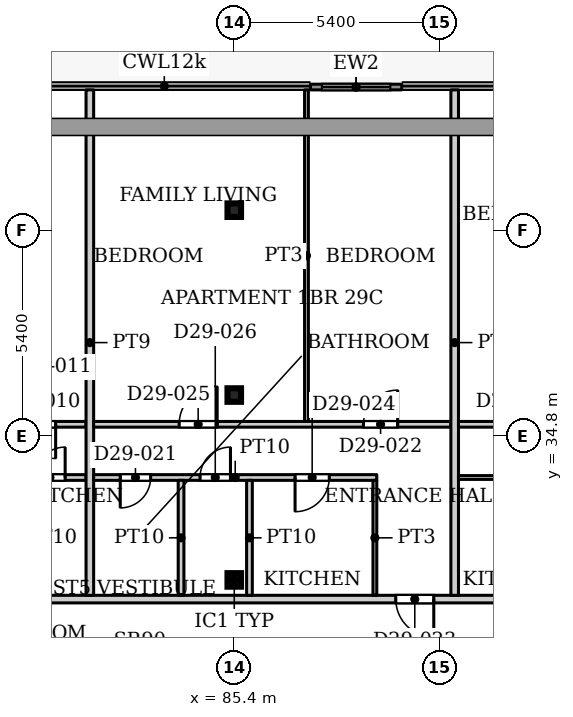
"""IFC4 building model, lengths in metres.
Left out: names, types, materials, properties, quantities, classifications, styles, units other than length and angle.
Written with IfcOpenShell. Run it as: python <this file> out.ifc"""

import sys

from ifc_helpers import new_model, si_unit, direction, frame, frame_2d, origin, origin_2d, place, context, subcontext, project, spatial, rectangle, hollow_rectangle, extrude, source, transform, mapped, element, fill, save


model = new_model("IFC4")
c1 = context("Model", 3, precision=1e-05, world=origin(), true_north=direction((0.0, 1.0)))
c2 = subcontext(c1, "Body", "Model", "MODEL_VIEW")
j1 = project(units=[si_unit("LENGTHUNIT", "METRE"), si_unit("PLANEANGLEUNIT", "RADIAN")], contexts=[c1])
p1 = place(None, origin())
s1 = spatial("IfcSite", under=j1, at=p1, CompositionType="ELEMENT")
p2 = place(p1, origin())
s2 = spatial("IfcBuilding", under=s1, at=p2, CompositionType="ELEMENT")
p3 = place(p2, frame((0.0, 0.0, 125.3)))
s3 = spatial("IfcBuildingStorey", under=s2, at=p3, CompositionType="ELEMENT", Elevation=125.3)
for number, where, z_axis, x_axis in (
    (1, (85.4, 31.005, 0.0), (0.0, 0.0, 1.0), (1.0, 0.0, 0.0)),
    (2, (85.4, 35.87, 0.0), (0.0, 0.0, 1.0), (1.0, 0.0, 0.0)),
    (3, (85.4, 40.735, 0.0), (0.0, 0.0, 1.0), (1.0, 0.0, 0.0)),
):
    element("IfcColumn", number, at=place(p3, frame(where, z_axis=z_axis, x_axis=x_axis)), inside=s3, PredefinedType="COLUMN", context=c2, shape_type="SweptSolid", body=[
        extrude(hollow_rectangle(XDim=0.356, YDim=0.356, WallThickness=0.016, InnerFilletRadius=0.016, OuterFilletRadius=0.032, at=origin_2d()), origin(), (0.0, 0.0, 1.0), 3.9),
    ])
p4 = place(p3, frame((87.406, 43.975, 0.0), z_axis=(0.0, 0.0, 1.0), x_axis=(1.0, 0.0, 0.0)))
e4 = element("IfcWall", 4, at=p4, inside=s3, PredefinedType="SOLIDWALL", context=c2, shape_type="SweptSolid", body=[
    extrude(rectangle(XDim=2.4, YDim=0.15, at=frame_2d((1.2, 0.0))), origin(), (0.0, 0.0, 1.0), 3.75),
])
p5 = place(p4, frame((0.3, 0.0, 0.0)))
e5 = element("IfcOpeningElement", 5, at=p5, cuts=e4, PredefinedType="OPENING", context=c2, shape_type="SweptSolid", body=[
    extrude(rectangle(XDim=1.8, YDim=2.4, at=frame_2d((0.9, 1.2))), frame((0.0, 0.085, 0.0), z_axis=(0.0, -1.0, 0.0), x_axis=(1.0, 0.0, 0.0)), (0.0, 0.0, 1.0), 0.17),
])
p6 = place(p3, frame((55.9, 30.5, 0.0), z_axis=(0.0, 0.0, 1.0), x_axis=(1.0, 0.0, 0.0)))
e6 = element("IfcWall", 6, at=p6, inside=s3, PredefinedType="PARTITIONING", context=c2, shape_type="SweptSolid", body=[
    extrude(rectangle(XDim=42.2, YDim=0.2, at=frame_2d((21.1, 0.0))), origin(), (0.0, 0.0, 1.0), 3.6),
])
p7 = place(p6, frame((0.45, 0.0, 0.0)))
e7 = element("IfcOpeningElement", 7, at=p7, cuts=e6, PredefinedType="OPENING", context=c2, shape_type="SweptSolid", body=[
    extrude(rectangle(XDim=1.0, YDim=2.1, at=frame_2d((0.5, 1.05))), frame((0.0, 0.11, 0.0), z_axis=(0.0, -1.0, 0.0), x_axis=(1.0, 0.0, 0.0)), (0.0, 0.0, 1.0), 0.22),
])
p8 = place(p6, frame((20.1, 0.0, 0.0)))
e8 = element("IfcOpeningElement", 8, at=p8, cuts=e6, PredefinedType="OPENING", context=c2, shape_type="SweptSolid", body=[
    extrude(rectangle(XDim=1.0, YDim=2.1, at=frame_2d((0.5, 1.05))), frame((0.0, 0.11, 0.0), z_axis=(0.0, -1.0, 0.0), x_axis=(1.0, 0.0, 0.0)), (0.0, 0.0, 1.0), 0.22),
])
p9 = place(p6, frame((33.75, 0.0, 0.0)))
e9 = element("IfcOpeningElement", 9, at=p9, cuts=e6, PredefinedType="OPENING", context=c2, shape_type="SweptSolid", body=[
    extrude(rectangle(XDim=1.0, YDim=2.1, at=frame_2d((0.5, 1.05))), frame((0.0, 0.11, 0.0), z_axis=(0.0, -1.0, 0.0), x_axis=(1.0, 0.0, 0.0)), (0.0, 0.0, 1.0), 0.22),
])
p10 = place(p6, frame((38.7, 0.0, 0.0)))
e10 = element("IfcOpeningElement", 10, at=p10, cuts=e6, PredefinedType="OPENING", context=c2, shape_type="SweptSolid", body=[
    extrude(rectangle(XDim=1.0, YDim=2.1, at=frame_2d((0.5, 1.05))), frame((0.0, 0.11, 0.0), z_axis=(0.0, -1.0, 0.0), x_axis=(1.0, 0.0, 0.0)), (0.0, 0.0, 1.0), 0.22),
])
p11 = place(p3, frame((65.8, 35.1, 0.0), z_axis=(0.0, 0.0, 1.0), x_axis=(1.0, 0.0, 0.0)))
e11 = element("IfcWall", 11, at=p11, inside=s3, PredefinedType="PARTITIONING", context=c2, shape_type="SweptSolid", body=[
    extrude(rectangle(XDim=15.7, YDim=0.15, at=frame_2d((7.85, 0.0))), origin(), (0.0, 0.0, 1.0), 3.6),
])
p12 = place(p11, frame((3.95, 0.0, 0.0)))
e12 = element("IfcOpeningElement", 12, at=p12, cuts=e11, PredefinedType="OPENING", context=c2, shape_type="SweptSolid", body=[
    extrude(rectangle(XDim=0.9, YDim=2.1, at=frame_2d((0.45, 1.05))), frame((0.0, 0.085, 0.0), z_axis=(0.0, -1.0, 0.0), x_axis=(1.0, 0.0, 0.0)), (0.0, 0.0, 1.0), 0.17),
])
p13 = place(p11, frame((14.0, 0.0, 0.0)))
e13 = element("IfcOpeningElement", 13, at=p13, cuts=e11, PredefinedType="OPENING", context=c2, shape_type="SweptSolid", body=[
    extrude(rectangle(XDim=0.9, YDim=2.1, at=frame_2d((0.45, 1.05))), frame((0.0, 0.085, 0.0), z_axis=(0.0, -1.0, 0.0), x_axis=(1.0, 0.0, 0.0)), (0.0, 0.0, 1.0), 0.17),
])
p14 = place(p11, frame((1.05, 0.0, 0.0)))
e14 = element("IfcOpeningElement", 14, at=p14, cuts=e11, PredefinedType="OPENING", context=c2, shape_type="SweptSolid", body=[
    extrude(rectangle(XDim=1.0, YDim=2.1, at=frame_2d((0.5, 1.05))), frame((0.0, 0.085, 0.0), z_axis=(0.0, -1.0, 0.0), x_axis=(1.0, 0.0, 0.0)), (0.0, 0.0, 1.0), 0.17),
])
p15 = place(p11, frame((10.5, 0.0, 0.0)))
e15 = element("IfcOpeningElement", 15, at=p15, cuts=e11, PredefinedType="OPENING", context=c2, shape_type="SweptSolid", body=[
    extrude(rectangle(XDim=1.6, YDim=2.1, at=frame_2d((0.8, 1.05))), frame((0.0, 0.085, 0.0), z_axis=(0.0, -1.0, 0.0), x_axis=(1.0, 0.0, 0.0)), (0.0, 0.0, 1.0), 0.17),
])
p16 = place(p11, frame((6.05, 0.0, 0.0)))
e16 = element("IfcOpeningElement", 16, at=p16, cuts=e11, PredefinedType="OPENING", context=c2, shape_type="SweptSolid", body=[
    extrude(rectangle(XDim=0.9, YDim=2.1, at=frame_2d((0.45, 1.05))), frame((0.0, 0.085, 0.0), z_axis=(0.0, -1.0, 0.0), x_axis=(1.0, 0.0, 0.0)), (0.0, 0.0, 1.0), 0.17),
])
p17 = place(p3, frame((77.325, 33.7, 0.0), z_axis=(0.0, 0.0, 1.0), x_axis=(1.0, 0.0, 0.0)))
e17 = element("IfcWall", 17, at=p17, inside=s3, PredefinedType="PARTITIONING", context=c2, shape_type="SweptSolid", body=[
    extrude(rectangle(XDim=4.175, YDim=0.15, at=frame_2d((2.087, 0.0))), origin(), (0.0, 0.0, 1.0), 3.6),
])
p18 = place(p17, frame((0.725, 0.0, 0.0)))
e18 = element("IfcOpeningElement", 18, at=p18, cuts=e17, PredefinedType="OPENING", context=c2, shape_type="SweptSolid", body=[
    extrude(rectangle(XDim=0.8, YDim=2.1, at=frame_2d((0.4, 1.05))), frame((0.0, 0.085, 0.0), z_axis=(0.0, -1.0, 0.0), x_axis=(1.0, 0.0, 0.0)), (0.0, 0.0, 1.0), 0.17),
])
p19 = place(p17, frame((2.825, 0.0, 0.0)))
e19 = element("IfcOpeningElement", 19, at=p19, cuts=e17, PredefinedType="OPENING", context=c2, shape_type="SweptSolid", body=[
    extrude(rectangle(XDim=0.8, YDim=2.1, at=frame_2d((0.4, 1.05))), frame((0.0, 0.085, 0.0), z_axis=(0.0, -1.0, 0.0), x_axis=(1.0, 0.0, 0.0)), (0.0, 0.0, 1.0), 0.17),
])
p20 = place(p3, frame((81.6, 30.6, 0.0), z_axis=(0.0, 0.0, 1.0), x_axis=(0.0, 1.0, 0.0)))
e20 = element("IfcWall", 20, at=p20, inside=s3, PredefinedType="PARTITIONING", context=c2, shape_type="SweptSolid", body=[
    extrude(rectangle(XDim=13.3, YDim=0.2, at=frame_2d((6.65, 0.0))), origin(), (0.0, 0.0, 1.0), 3.6),
])
p21 = place(p3, frame((81.7, 33.7, 0.0), z_axis=(0.0, 0.0, 1.0), x_axis=(1.0, 0.0, 0.0)))
e21 = element("IfcWall", 21, at=p21, inside=s3, PredefinedType="PARTITIONING", context=c2, shape_type="SweptSolid", body=[
    extrude(rectangle(XDim=7.45, YDim=0.15, at=frame_2d((3.725, 0.0))), origin(), (0.0, 0.0, 1.0), 3.6),
])
p22 = place(p21, frame((0.7, 0.0, 0.0)))
e22 = element("IfcOpeningElement", 22, at=p22, cuts=e21, PredefinedType="OPENING", context=c2, shape_type="SweptSolid", body=[
    extrude(rectangle(XDim=0.8, YDim=2.1, at=frame_2d((0.4, 1.05))), frame((0.0, 0.085, 0.0), z_axis=(0.0, -1.0, 0.0), x_axis=(1.0, 0.0, 0.0)), (0.0, 0.0, 1.0), 0.17),
])
p23 = place(p21, frame((5.3, 0.0, 0.0)))
e23 = element("IfcOpeningElement", 23, at=p23, cuts=e21, PredefinedType="OPENING", context=c2, shape_type="SweptSolid", body=[
    extrude(rectangle(XDim=0.9, YDim=2.1, at=frame_2d((0.45, 1.05))), frame((0.0, 0.085, 0.0), z_axis=(0.0, -1.0, 0.0), x_axis=(1.0, 0.0, 0.0)), (0.0, 0.0, 1.0), 0.17),
])
p24 = place(p21, frame((2.8, 0.0, 0.0)))
e24 = element("IfcOpeningElement", 24, at=p24, cuts=e21, PredefinedType="OPENING", context=c2, shape_type="SweptSolid", body=[
    extrude(rectangle(XDim=0.8, YDim=2.1, at=frame_2d((0.4, 1.05))), frame((0.0, 0.085, 0.0), z_axis=(0.0, -1.0, 0.0), x_axis=(1.0, 0.0, 0.0)), (0.0, 0.0, 1.0), 0.17),
])
p25 = place(p3, frame((81.7, 35.1, 0.0), z_axis=(0.0, 0.0, 1.0), x_axis=(1.0, 0.0, 0.0)))
e25 = element("IfcWall", 25, at=p25, inside=s3, PredefinedType="PARTITIONING", context=c2, shape_type="SweptSolid", body=[
    extrude(rectangle(XDim=9.4, YDim=0.15, at=frame_2d((4.7, 0.0))), origin(), (0.0, 0.0, 1.0), 3.6),
])
p26 = place(p25, frame((7.1, 0.0, 0.0)))
e26 = element("IfcOpeningElement", 26, at=p26, cuts=e25, PredefinedType="OPENING", context=c2, shape_type="SweptSolid", body=[
    extrude(rectangle(XDim=0.9, YDim=2.1, at=frame_2d((0.45, 1.05))), frame((0.0, 0.085, 0.0), z_axis=(0.0, -1.0, 0.0), x_axis=(1.0, 0.0, 0.0)), (0.0, 0.0, 1.0), 0.17),
])
p27 = place(p25, frame((2.25, 0.0, 0.0)))
e27 = element("IfcOpeningElement", 27, at=p27, cuts=e25, PredefinedType="OPENING", context=c2, shape_type="SweptSolid", body=[
    extrude(rectangle(XDim=1.0, YDim=2.1, at=frame_2d((0.5, 1.05))), frame((0.0, 0.085, 0.0), z_axis=(0.0, -1.0, 0.0), x_axis=(1.0, 0.0, 0.0)), (0.0, 0.0, 1.0), 0.17),
])
for number, where, z_axis, x_axis in (
    (28, (84.0, 30.6, 0.0), (0.0, 0.0, 1.0), (0.0, 1.0, 0.0)),
    (29, (85.8, 30.6, 0.0), (0.0, 0.0, 1.0), (0.0, 1.0, 0.0)),
):
    element("IfcWall", number, at=place(p3, frame(where, z_axis=z_axis, x_axis=x_axis)), inside=s3, PredefinedType="PARTITIONING", context=c2, shape_type="SweptSolid", body=[
        extrude(rectangle(XDim=3.025, YDim=0.15, at=frame_2d((1.512, 0.0))), origin(), (0.0, 0.0, 1.0), 3.6),
    ])
p28 = place(p3, frame((87.3, 35.175, 0.0), z_axis=(0.0, 0.0, 1.0), x_axis=(0.0, 1.0, 0.0)))
e30 = element("IfcWall", 30, at=p28, inside=s3, PredefinedType="PARTITIONING", context=c2, shape_type="SweptSolid", body=[
    extrude(rectangle(XDim=8.725, YDim=0.1, at=frame_2d((4.362, 0.0))), origin(), (0.0, 0.0, 1.0), 3.6),
])
p29 = place(p3, frame((89.1, 30.6, 0.0), z_axis=(0.0, 0.0, 1.0), x_axis=(0.0, 1.0, 0.0)))
e31 = element("IfcWall", 31, at=p29, inside=s3, PredefinedType="PARTITIONING", context=c2, shape_type="SweptSolid", body=[
    extrude(rectangle(XDim=3.025, YDim=0.1, at=frame_2d((1.512, 0.0))), origin(), (0.0, 0.0, 1.0), 3.6),
])
p30 = place(p3, frame((91.2, 30.6, 0.0), z_axis=(0.0, 0.0, 1.0), x_axis=(0.0, 1.0, 0.0)))
e32 = element("IfcWall", 32, at=p30, inside=s3, PredefinedType="PARTITIONING", context=c2, shape_type="SweptSolid", body=[
    extrude(rectangle(XDim=13.3, YDim=0.2, at=frame_2d((6.65, 0.0))), origin(), (0.0, 0.0, 1.0), 3.6),
])
p31 = place(p3, frame((91.3, 33.7, 0.0), z_axis=(0.0, 0.0, 1.0), x_axis=(1.0, 0.0, 0.0)))
e33 = element("IfcWall", 33, at=p31, inside=s3, PredefinedType="PARTITIONING", context=c2, shape_type="SweptSolid", body=[
    extrude(rectangle(XDim=2.85, YDim=0.1, at=frame_2d((1.425, 0.0))), origin(), (0.0, 0.0, 1.0), 3.6),
])
p32 = place(p31, frame((0.95, 0.0, 0.0)))
e34 = element("IfcOpeningElement", 34, at=p32, cuts=e33, PredefinedType="OPENING", context=c2, shape_type="SweptSolid", body=[
    extrude(rectangle(XDim=0.9, YDim=2.1, at=frame_2d((0.45, 1.05))), frame((0.0, 0.06, 0.0), z_axis=(0.0, -1.0, 0.0), x_axis=(1.0, 0.0, 0.0)), (0.0, 0.0, 1.0), 0.12),
])
p33 = place(p3, frame((91.3, 35.1, 0.0), z_axis=(0.0, 0.0, 1.0), x_axis=(1.0, 0.0, 0.0)))
e35 = element("IfcWall", 35, at=p33, inside=s3, PredefinedType="PARTITIONING", context=c2, shape_type="SweptSolid", body=[
    extrude(rectangle(XDim=8.6, YDim=0.15, at=frame_2d((4.3, 0.0))), origin(), (0.0, 0.0, 1.0), 3.6),
])
p34 = place(p33, frame((1.1, 0.0, 0.0)))
e36 = element("IfcOpeningElement", 36, at=p34, cuts=e35, PredefinedType="OPENING", context=c2, shape_type="SweptSolid", body=[
    extrude(rectangle(XDim=0.9, YDim=2.1, at=frame_2d((0.45, 1.05))), frame((0.0, 0.085, 0.0), z_axis=(0.0, -1.0, 0.0), x_axis=(1.0, 0.0, 0.0)), (0.0, 0.0, 1.0), 0.17),
])
p35 = place(p33, frame((5.4, 0.0, 0.0)))
e37 = element("IfcOpeningElement", 37, at=p35, cuts=e35, PredefinedType="OPENING", context=c2, shape_type="SweptSolid", body=[
    extrude(rectangle(XDim=1.0, YDim=2.1, at=frame_2d((0.5, 1.05))), frame((0.0, 0.085, 0.0), z_axis=(0.0, -1.0, 0.0), x_axis=(1.0, 0.0, 0.0)), (0.0, 0.0, 1.0), 0.17),
])
m1 = source(origin(), c2, "Body", "SweptSolid", [
    extrude(rectangle(XDim=1.8, YDim=2.4, at=frame_2d((0.9, 1.2))), frame((0.0, 0.025, 0.0), z_axis=(0.0, -1.0, 0.0), x_axis=(1.0, 0.0, 0.0)), (0.0, 0.0, 1.0), 0.05),
])
p36 = place(p5, origin())
e38 = element("IfcDoor", 38, at=p36, inside=s3, OperationType="SLIDING_TO_LEFT", PredefinedType="DOOR", context=c2, shape_type="MappedRepresentation", body=[
    mapped(m1, transform((0.0, 0.0, 0.0), x_axis=(1.0, 0.0, 0.0), y_axis=(0.0, 1.0, 0.0), z_axis=(0.0, 0.0, 1.0), scale=1.0)),
])
fill(e5, e38)
m2 = source(origin(), c2, "Body", "SweptSolid", [
    extrude(rectangle(XDim=0.9, YDim=2.1, at=frame_2d((0.45, 1.05))), frame((0.0, 0.025, 0.0), z_axis=(0.0, -1.0, 0.0), x_axis=(1.0, 0.0, 0.0)), (0.0, 0.0, 1.0), 0.05),
])
p37 = place(p13, origin())
e39 = element("IfcDoor", 39, at=p37, inside=s3, OperationType="SINGLE_SWING_RIGHT", PredefinedType="DOOR", context=c2, shape_type="MappedRepresentation", body=[
    mapped(m2, transform((0.0, 0.0, 0.0), x_axis=(1.0, 0.0, 0.0), y_axis=(0.0, 1.0, 0.0), z_axis=(0.0, 0.0, 1.0), scale=1.0)),
])
fill(e13, e39)
m3 = source(origin(), c2, "Body", "SweptSolid", [
    extrude(rectangle(XDim=0.8, YDim=2.1, at=frame_2d((0.4, 1.05))), frame((0.0, 0.025, 0.0), z_axis=(0.0, -1.0, 0.0), x_axis=(1.0, 0.0, 0.0)), (0.0, 0.0, 1.0), 0.05),
])
p38 = place(p19, origin())
e40 = element("IfcDoor", 40, at=p38, inside=s3, OperationType="SINGLE_SWING_LEFT", PredefinedType="DOOR", context=c2, shape_type="MappedRepresentation", body=[
    mapped(m3, transform((0.0, 0.0, 0.0), x_axis=(1.0, 0.0, 0.0), y_axis=(0.0, 1.0, 0.0), z_axis=(0.0, 0.0, 1.0), scale=1.0)),
])
fill(e19, e40)
p39 = place(p22, origin())
e41 = element("IfcDoor", 41, at=p39, inside=s3, OperationType="SINGLE_SWING_RIGHT", PredefinedType="DOOR", context=c2, shape_type="MappedRepresentation", body=[
    mapped(m3, transform((0.0, 0.0, 0.0), x_axis=(1.0, 0.0, 0.0), y_axis=(0.0, 1.0, 0.0), z_axis=(0.0, 0.0, 1.0), scale=1.0)),
])
fill(e22, e41)
p40 = place(p26, origin())
e42 = element("IfcDoor", 42, at=p40, inside=s3, OperationType="SINGLE_SWING_LEFT", PredefinedType="DOOR", context=c2, shape_type="MappedRepresentation", body=[
    mapped(m2, transform((0.0, 0.0, 0.0), x_axis=(1.0, 0.0, 0.0), y_axis=(0.0, 1.0, 0.0), z_axis=(0.0, 0.0, 1.0), scale=1.0)),
])
fill(e26, e42)
m4 = source(origin(), c2, "Body", "SweptSolid", [
    extrude(rectangle(XDim=1.0, YDim=2.1, at=frame_2d((0.5, 1.05))), frame((0.0, 0.025, 0.0), z_axis=(0.0, -1.0, 0.0), x_axis=(1.0, 0.0, 0.0)), (0.0, 0.0, 1.0), 0.05),
])
p41 = place(p9, origin())
e43 = element("IfcDoor", 43, at=p41, inside=s3, OperationType="SINGLE_SWING_RIGHT", PredefinedType="DOOR", context=c2, shape_type="MappedRepresentation", body=[
    mapped(m4, transform((0.0, 0.0, 0.0), x_axis=(1.0, 0.0, 0.0), y_axis=(0.0, 1.0, 0.0), z_axis=(0.0, 0.0, 1.0), scale=1.0)),
])
fill(e9, e43)
p42 = place(p23, origin())
e44 = element("IfcDoor", 44, at=p42, inside=s3, OperationType="SINGLE_SWING_RIGHT", PredefinedType="DOOR", context=c2, shape_type="MappedRepresentation", body=[
    mapped(m2, transform((0.0, 0.0, 0.0), x_axis=(1.0, 0.0, 0.0), y_axis=(0.0, 1.0, 0.0), z_axis=(0.0, 0.0, 1.0), scale=1.0)),
])
fill(e23, e44)
m5 = source(origin(), c2, "Body", "SweptSolid", [
    extrude(rectangle(XDim=1.0, YDim=2.1, at=frame_2d((0.5, 1.05))), frame((0.0, 0.025, 0.0), z_axis=(0.0, -1.0, 0.0), x_axis=(1.0, 0.0, 0.0)), (0.0, 0.0, 1.0), 0.05),
])
p43 = place(p27, origin())
e45 = element("IfcDoor", 45, at=p43, inside=s3, OperationType="SINGLE_SWING_LEFT", PredefinedType="DOOR", context=c2, shape_type="MappedRepresentation", body=[
    mapped(m5, transform((0.0, 0.0, 0.0), x_axis=(1.0, 0.0, 0.0), y_axis=(0.0, 1.0, 0.0), z_axis=(0.0, 0.0, 1.0), scale=1.0)),
])
fill(e27, e45)
p44 = place(p24, origin())
e46 = element("IfcDoor", 46, at=p44, inside=s3, OperationType="SINGLE_SWING_LEFT", PredefinedType="DOOR", context=c2, shape_type="MappedRepresentation", body=[
    mapped(m3, transform((0.0, 0.0, 0.0), x_axis=(1.0, 0.0, 0.0), y_axis=(0.0, 1.0, 0.0), z_axis=(0.0, 0.0, 1.0), scale=1.0)),
])
fill(e24, e46)
save(model, sys.argv[1])
